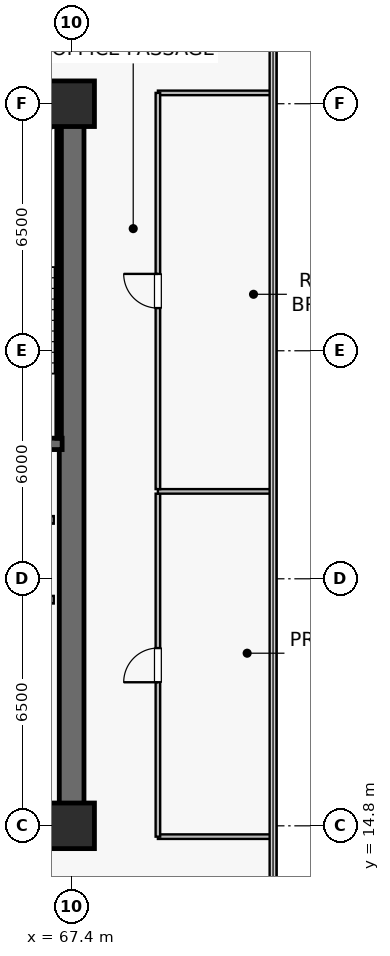
"""IFC4 building model, lengths in metres.
Left out: names, types, materials, properties, quantities, classifications, styles, units other than length and angle.
Written with IfcOpenShell. Run it as: python <this file> out.ifc"""

import sys

from ifc_helpers import new_model, si_unit, direction, frame, frame_2d, origin, origin_2d, place, context, subcontext, project, spatial, rectangle, extrude, source, transform, mapped, element, fill, save


model = new_model("IFC4")
c1 = context("Model", 3, precision=1e-05, world=origin(), true_north=direction((0.0, 1.0)))
c2 = subcontext(c1, "Body", "Model", "MODEL_VIEW")
j1 = project(units=[si_unit("LENGTHUNIT", "METRE"), si_unit("PLANEANGLEUNIT", "RADIAN")], contexts=[c1])
p1 = place(None, origin())
s1 = spatial("IfcSite", under=j1, at=p1, CompositionType="ELEMENT")
p2 = place(p1, origin())
s2 = spatial("IfcBuilding", under=s1, at=p2, CompositionType="ELEMENT")
p3 = place(p2, frame((0.0, 0.0, 187.1)))
s3 = spatial("IfcBuildingStorey", under=s2, at=p3, CompositionType="ELEMENT", Elevation=187.1)
p4 = place(p3, frame((52.275, 14.8, 0.0), z_axis=(0.0, 0.0, 1.0), x_axis=(1.0, 0.0, 0.0)))
e1 = element("IfcWall", 1, at=p4, inside=s3, PredefinedType="SHEAR", context=c2, shape_type="SweptSolid", body=[
    extrude(rectangle(XDim=15.45, YDim=0.65, at=frame_2d((7.725, 0.0))), origin(), (0.0, 0.0, 1.0), 3.79),
])
p5 = place(p3, frame((52.275, 33.8, 0.0), z_axis=(0.0, 0.0, 1.0), x_axis=(1.0, 0.0, 0.0)))
e2 = element("IfcWall", 2, at=p5, inside=s3, PredefinedType="SHEAR", context=c2, shape_type="SweptSolid", body=[
    extrude(rectangle(XDim=15.45, YDim=0.65, at=frame_2d((7.725, 0.0))), origin(), (0.0, 0.0, 1.0), 3.79),
])
p6 = place(p5, frame((9.25, 0.0, 0.0)))
e3 = element("IfcOpeningElement", 3, at=p6, cuts=e2, PredefinedType="OPENING", context=c2, shape_type="SweptSolid", body=[
    extrude(rectangle(XDim=0.95, YDim=2.15, at=frame_2d((0.475, 1.075))), frame((0.0, 0.335, 0.0), z_axis=(0.0, -1.0, 0.0), x_axis=(1.0, 0.0, 0.0)), (0.0, 0.0, 1.0), 0.67),
])
p7 = place(p5, frame((6.735, 0.0, 0.0)))
e4 = element("IfcOpeningElement", 4, at=p7, cuts=e2, PredefinedType="OPENING", context=c2, shape_type="SweptSolid", body=[
    extrude(rectangle(XDim=0.95, YDim=2.15, at=frame_2d((0.475, 1.075))), frame((0.0, 0.335, 0.0), z_axis=(0.0, -1.0, 0.0), x_axis=(1.0, 0.0, 0.0)), (0.0, 0.0, 1.0), 0.67),
])
p8 = place(p5, frame((4.185, 0.0, 0.0)))
e5 = element("IfcOpeningElement", 5, at=p8, cuts=e2, PredefinedType="OPENING", context=c2, shape_type="SweptSolid", body=[
    extrude(rectangle(XDim=0.95, YDim=2.15, at=frame_2d((0.475, 1.075))), frame((0.0, 0.335, 0.0), z_axis=(0.0, -1.0, 0.0), x_axis=(1.0, 0.0, 0.0)), (0.0, 0.0, 1.0), 0.67),
])
p9 = place(p5, frame((1.635, 0.0, 0.0)))
e6 = element("IfcOpeningElement", 6, at=p9, cuts=e2, PredefinedType="OPENING", context=c2, shape_type="SweptSolid", body=[
    extrude(rectangle(XDim=0.95, YDim=2.15, at=frame_2d((0.475, 1.075))), frame((0.0, 0.335, 0.0), z_axis=(0.0, -1.0, 0.0), x_axis=(1.0, 0.0, 0.0)), (0.0, 0.0, 1.0), 0.67),
])
p10 = place(p3, frame((67.4, 15.125, 0.0), z_axis=(0.0, 0.0, 1.0), x_axis=(0.0, 1.0, 0.0)))
e7 = element("IfcWall", 7, at=p10, inside=s3, PredefinedType="SHEAR", context=c2, shape_type="SweptSolid", body=[
    extrude(rectangle(XDim=18.35, YDim=0.65, at=frame_2d((9.175, 0.0))), origin(), (0.0, 0.0, 1.0), 3.79),
])
p11 = place(p3, frame((63.35, 24.85, 0.0), z_axis=(0.0, 0.0, 1.0), x_axis=(1.0, 0.0, 0.0)))
e8 = element("IfcWall", 8, at=p11, inside=s3, PredefinedType="SHEAR", context=c2, shape_type="SweptSolid", body=[
    extrude(rectangle(XDim=3.8, YDim=0.3, at=frame_2d((1.9, 0.0))), origin(), (0.0, 0.0, 1.0), 3.79),
])
p12 = place(p3, frame((63.35, 33.4, 0.0), z_axis=(0.0, 0.0, 1.0), x_axis=(1.0, 0.0, 0.0)))
e9 = element("IfcWall", 9, at=p12, inside=s3, PredefinedType="SOLIDWALL", context=c2, shape_type="SweptSolid", body=[
    extrude(rectangle(XDim=3.72, YDim=0.12, at=frame_2d((1.86, 0.0))), origin(), (0.0, 0.0, 1.0), 3.79),
])
p13 = place(p3, frame((67.07, 25.0, 0.0), z_axis=(0.0, 0.0, 1.0), x_axis=(0.0, 1.0, 0.0)))
e10 = element("IfcWall", 10, at=p13, inside=s3, PredefinedType="SOLIDWALL", context=c2, shape_type="SweptSolid", body=[
    extrude(rectangle(XDim=8.32, YDim=0.12, at=frame_2d((4.16, 0.0))), origin(), (0.0, 0.0, 1.0), 3.79),
])
m1 = source(origin(), c2, "Body", "SweptSolid", [
    extrude(rectangle(XDim=1.2, YDim=1.2, at=origin_2d()), origin(), (0.0, 0.0, 1.0), 4.1),
])
for number, where, z_axis, x_axis in (
    (11, (67.4, 14.8, 0.0), (0.0, 0.0, 1.0), (1.0, 0.0, 0.0)),
    (12, (67.4, 33.8, 0.0), (0.0, 0.0, 1.0), (1.0, 0.0, 0.0)),
):
    element("IfcColumn", number, at=place(p3, frame(where, z_axis=z_axis, x_axis=x_axis)), inside=s3, PredefinedType="COLUMN", context=c2, shape_type="MappedRepresentation", body=[
        mapped(m1, transform((0.0, 0.0, 0.0), scale=1.0)),
    ])
for number, where, z_axis, x_axis in (
    (13, (64.67, 20.75, 0.0), (0.0, 0.0, 1.0), (1.0, 0.0, 0.0)),
    (14, (64.67, 22.85, 0.0), (0.0, 0.0, 1.0), (1.0, 0.0, 0.0)),
):
    element("IfcWall", number, at=place(p3, frame(where, z_axis=z_axis, x_axis=x_axis)), inside=s3, PredefinedType="SOLIDWALL", context=c2, shape_type="SweptSolid", body=[
        extrude(rectangle(XDim=2.26, YDim=0.2, at=frame_2d((1.13, 0.0))), origin(), (0.0, 0.0, 1.0), 3.79),
    ])
for number, where, z_axis, x_axis in (
    (15, (69.67, 14.515, 0.0), (0.0, 0.0, 1.0), (1.0, 0.0, 0.0)),
    (16, (69.67, 34.085, 0.0), (0.0, 0.0, 1.0), (1.0, 0.0, 0.0)),
):
    element("IfcWall", number, at=place(p3, frame(where, z_axis=z_axis, x_axis=x_axis)), inside=s3, PredefinedType="PARTITIONING", context=c2, shape_type="SweptSolid", body=[
        extrude(rectangle(XDim=3.02, YDim=0.12, at=frame_2d((1.51, 0.0))), origin(), (0.0, 0.0, 1.0), 3.79),
    ])
p14 = place(p3, frame((69.67, 14.515, 0.0), z_axis=(0.0, 0.0, 1.0), x_axis=(0.0, 1.0, 0.0)))
e17 = element("IfcWall", 17, at=p14, inside=s3, PredefinedType="PARTITIONING", context=c2, shape_type="SweptSolid", body=[
    extrude(rectangle(XDim=9.025, YDim=0.12, at=frame_2d((4.513, 0.0))), origin(), (0.0, 0.0, 1.0), 3.79),
])
p15 = place(p14, frame((4.062, 0.0, 0.0)))
e18 = element("IfcOpeningElement", 18, at=p15, cuts=e17, PredefinedType="OPENING", context=c2, shape_type="SweptSolid", body=[
    extrude(rectangle(XDim=0.9, YDim=2.1, at=frame_2d((0.45, 1.05))), frame((0.0, 0.07, 0.0), z_axis=(0.0, -1.0, 0.0), x_axis=(1.0, 0.0, 0.0)), (0.0, 0.0, 1.0), 0.14),
])
p16 = place(p3, frame((69.67, 23.6, 0.0), z_axis=(0.0, 0.0, 1.0), x_axis=(1.0, 0.0, 0.0)))
e19 = element("IfcWall", 19, at=p16, inside=s3, PredefinedType="PARTITIONING", context=c2, shape_type="SweptSolid", body=[
    extrude(rectangle(XDim=3.02, YDim=0.12, at=frame_2d((1.51, 0.0))), origin(), (0.0, 0.0, 1.0), 3.79),
])
p17 = place(p3, frame((69.67, 23.66, 0.0), z_axis=(0.0, 0.0, 1.0), x_axis=(0.0, 1.0, 0.0)))
e20 = element("IfcWall", 20, at=p17, inside=s3, PredefinedType="PARTITIONING", context=c2, shape_type="SweptSolid", body=[
    extrude(rectangle(XDim=10.425, YDim=0.12, at=frame_2d((5.212, 0.0))), origin(), (0.0, 0.0, 1.0), 3.79),
])
p18 = place(p17, frame((4.762, 0.0, 0.0)))
e21 = element("IfcOpeningElement", 21, at=p18, cuts=e20, PredefinedType="OPENING", context=c2, shape_type="SweptSolid", body=[
    extrude(rectangle(XDim=0.9, YDim=2.1, at=frame_2d((0.45, 1.05))), frame((0.0, 0.07, 0.0), z_axis=(0.0, -1.0, 0.0), x_axis=(1.0, 0.0, 0.0)), (0.0, 0.0, 1.0), 0.14),
])
m2 = source(origin(), c2, "Body", "SweptSolid", [
    extrude(rectangle(XDim=0.9, YDim=2.1, at=frame_2d((0.45, 1.05))), frame((0.0, 0.025, 0.0), z_axis=(0.0, -1.0, 0.0), x_axis=(1.0, 0.0, 0.0)), (0.0, 0.0, 1.0), 0.05),
])
p19 = place(p15, origin())
e22 = element("IfcDoor", 22, at=p19, inside=s3, OperationType="SINGLE_SWING_LEFT", PredefinedType="DOOR", context=c2, shape_type="MappedRepresentation", body=[
    mapped(m2, transform((0.0, 0.0, 0.0), scale=1.0)),
])
fill(e18, e22)
p20 = place(p18, origin())
e23 = element("IfcDoor", 23, at=p20, inside=s3, OperationType="SINGLE_SWING_RIGHT", PredefinedType="DOOR", context=c2, shape_type="MappedRepresentation", body=[
    mapped(m2, transform((0.0, 0.0, 0.0), scale=1.0)),
])
fill(e21, e23)
save(model, sys.argv[1])
